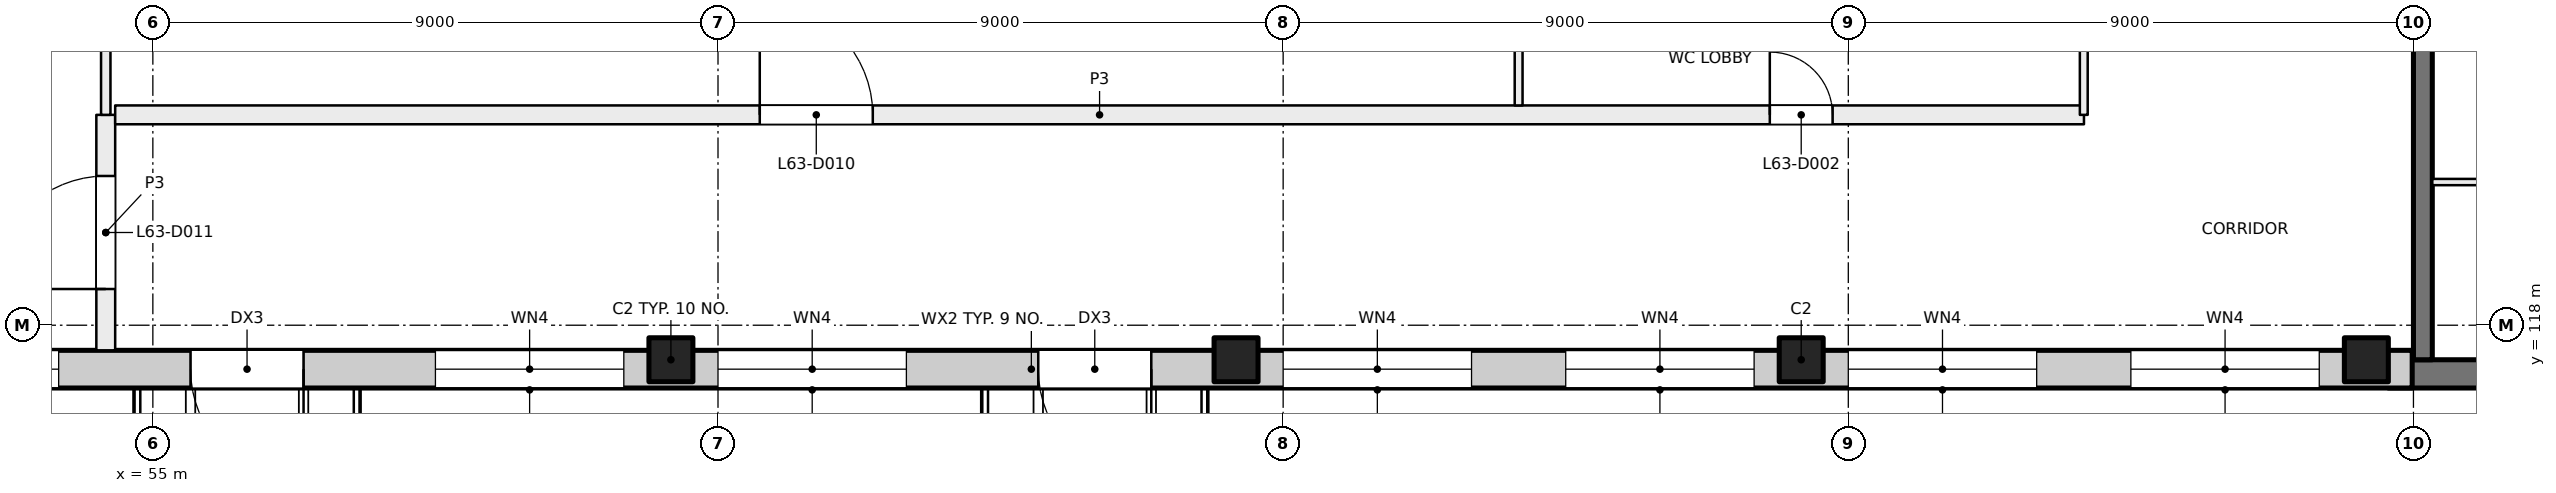
"""IFC4 building model, lengths in metres.
Left out: names, types, materials, properties, quantities, classifications, styles, units other than length and angle.
Written with IfcOpenShell. Run it as: python <this file> out.ifc"""

import sys

from ifc_helpers import new_model, si_unit, direction, frame, frame_2d, origin, origin_2d, place, context, subcontext, project, spatial, rectangle, extrude, element, fill, save


model = new_model("IFC4")
c1 = context("Model", 3, precision=1e-05, world=origin(), true_north=direction((0.0, 1.0)))
c2 = subcontext(c1, "Body", "Model", "MODEL_VIEW")
j1 = project(units=[si_unit("LENGTHUNIT", "METRE"), si_unit("PLANEANGLEUNIT", "RADIAN")], contexts=[c1])
p1 = place(None, origin())
s1 = spatial("IfcSite", under=j1, at=p1, CompositionType="ELEMENT")
p2 = place(p1, origin())
s2 = spatial("IfcBuilding", under=s1, at=p2, CompositionType="ELEMENT")
p3 = place(p2, frame((0.0, 0.0, 265.5)))
s3 = spatial("IfcBuildingStorey", under=s2, at=p3, CompositionType="ELEMENT", Elevation=265.5)
for number, where, z_axis, x_axis in (
    (1, (63.25, 117.45, 0.0), (0.0, 0.0, 1.0), (1.0, 0.0, 0.0)),
    (2, (72.25, 117.45, 0.0), (0.0, 0.0, 1.0), (1.0, 0.0, 0.0)),
    (3, (81.25, 117.45, 0.0), (0.0, 0.0, 1.0), (1.0, 0.0, 0.0)),
    (4, (90.25, 117.45, 0.0), (0.0, 0.0, 1.0), (1.0, 0.0, 0.0)),
):
    element("IfcColumn", number, at=place(p3, frame(where, z_axis=z_axis, x_axis=x_axis)), inside=s3, PredefinedType="COLUMN", context=c2, shape_type="SweptSolid", body=[
        extrude(rectangle(XDim=0.7, YDim=0.7, at=origin_2d()), origin(), (0.0, 0.0, 1.0), 4.0),
    ])
p4 = place(p3, frame((99.6, 117.225, 0.0), z_axis=(0.0, 0.0, 1.0), x_axis=(-1.0, 0.0, 0.0)))
e5 = element("IfcWall", 5, at=p4, inside=s3, PredefinedType="SHEAR", context=c2, shape_type="SweptSolid", body=[
    extrude(rectangle(XDim=9.0, YDim=0.45, at=frame_2d((4.5, 0.0))), origin(), (0.0, 0.0, 1.0), 4.0),
])
p5 = place(p3, frame((91.15, 126.2, 0.0), z_axis=(0.0, 0.0, 1.0), x_axis=(0.0, -1.0, 0.0)))
e6 = element("IfcWall", 6, at=p5, inside=s3, PredefinedType="SHEAR", context=c2, shape_type="SweptSolid", body=[
    extrude(rectangle(XDim=8.75, YDim=0.3, at=frame_2d((4.375, 0.0))), origin(), (0.0, 0.0, 1.0), 4.0),
])
p6 = place(p3, frame((90.98, 117.3, 0.0), z_axis=(0.0, 0.0, 1.0), x_axis=(-1.0, 0.0, 0.0)))
e7 = element("IfcWall", 7, at=p6, inside=s3, PredefinedType="SOLIDWALL", context=c2, shape_type="SweptSolid", body=[
    extrude(rectangle(XDim=43.98, YDim=0.6, at=frame_2d((21.99, 0.0))), origin(), (0.0, 0.0, 1.0), 3.625),
])
p7 = place(p6, frame((1.48, 0.0, 0.9)))
e8 = element("IfcOpeningElement", 8, at=p7, cuts=e7, PredefinedType="OPENING", context=c2, shape_type="SweptSolid", body=[
    extrude(rectangle(XDim=3.0, YDim=2.4, at=frame_2d((1.5, 1.2))), frame((0.0, 0.31, 0.0), z_axis=(0.0, -1.0, 0.0), x_axis=(1.0, 0.0, 0.0)), (0.0, 0.0, 1.0), 0.62),
])
p8 = place(p6, frame((5.98, 0.0, 0.9)))
e9 = element("IfcOpeningElement", 9, at=p8, cuts=e7, PredefinedType="OPENING", context=c2, shape_type="SweptSolid", body=[
    extrude(rectangle(XDim=3.0, YDim=2.4, at=frame_2d((1.5, 1.2))), frame((0.0, 0.31, 0.0), z_axis=(0.0, -1.0, 0.0), x_axis=(1.0, 0.0, 0.0)), (0.0, 0.0, 1.0), 0.62),
])
p9 = place(p6, frame((10.48, 0.0, 0.9)))
e10 = element("IfcOpeningElement", 10, at=p9, cuts=e7, PredefinedType="OPENING", context=c2, shape_type="SweptSolid", body=[
    extrude(rectangle(XDim=3.0, YDim=2.4, at=frame_2d((1.5, 1.2))), frame((0.0, 0.31, 0.0), z_axis=(0.0, -1.0, 0.0), x_axis=(1.0, 0.0, 0.0)), (0.0, 0.0, 1.0), 0.62),
])
p10 = place(p6, frame((14.98, 0.0, 0.9)))
e11 = element("IfcOpeningElement", 11, at=p10, cuts=e7, PredefinedType="OPENING", context=c2, shape_type="SweptSolid", body=[
    extrude(rectangle(XDim=3.0, YDim=2.4, at=frame_2d((1.5, 1.2))), frame((0.0, 0.31, 0.0), z_axis=(0.0, -1.0, 0.0), x_axis=(1.0, 0.0, 0.0)), (0.0, 0.0, 1.0), 0.62),
])
p11 = place(p6, frame((20.08, 0.0, 0.0)))
e12 = element("IfcOpeningElement", 12, at=p11, cuts=e7, PredefinedType="OPENING", context=c2, shape_type="SweptSolid", body=[
    extrude(rectangle(XDim=1.8, YDim=2.4, at=frame_2d((0.9, 1.2))), frame((0.0, 0.31, 0.0), z_axis=(0.0, -1.0, 0.0), x_axis=(1.0, 0.0, 0.0)), (0.0, 0.0, 1.0), 0.62),
])
p12 = place(p6, frame((23.98, 0.0, 0.9)))
e13 = element("IfcOpeningElement", 13, at=p12, cuts=e7, PredefinedType="OPENING", context=c2, shape_type="SweptSolid", body=[
    extrude(rectangle(XDim=3.0, YDim=2.4, at=frame_2d((1.5, 1.2))), frame((0.0, 0.31, 0.0), z_axis=(0.0, -1.0, 0.0), x_axis=(1.0, 0.0, 0.0)), (0.0, 0.0, 1.0), 0.62),
])
p13 = place(p6, frame((28.48, 0.0, 0.9)))
e14 = element("IfcOpeningElement", 14, at=p13, cuts=e7, PredefinedType="OPENING", context=c2, shape_type="SweptSolid", body=[
    extrude(rectangle(XDim=3.0, YDim=2.4, at=frame_2d((1.5, 1.2))), frame((0.0, 0.31, 0.0), z_axis=(0.0, -1.0, 0.0), x_axis=(1.0, 0.0, 0.0)), (0.0, 0.0, 1.0), 0.62),
])
p14 = place(p6, frame((33.58, 0.0, 0.0)))
e15 = element("IfcOpeningElement", 15, at=p14, cuts=e7, PredefinedType="OPENING", context=c2, shape_type="SweptSolid", body=[
    extrude(rectangle(XDim=1.8, YDim=2.4, at=frame_2d((0.9, 1.2))), frame((0.0, 0.31, 0.0), z_axis=(0.0, -1.0, 0.0), x_axis=(1.0, 0.0, 0.0)), (0.0, 0.0, 1.0), 0.62),
])
p15 = place(p6, frame((37.48, 0.0, 0.9)))
e16 = element("IfcOpeningElement", 16, at=p15, cuts=e7, PredefinedType="OPENING", context=c2, shape_type="SweptSolid", body=[
    extrude(rectangle(XDim=3.0, YDim=2.4, at=frame_2d((1.5, 1.2))), frame((0.0, 0.31, 0.0), z_axis=(0.0, -1.0, 0.0), x_axis=(1.0, 0.0, 0.0)), (0.0, 0.0, 1.0), 0.62),
])
p16 = place(p3, frame((93.4, 120.28, 0.0), z_axis=(0.0, 0.0, 1.0), x_axis=(-1.0, 0.0, 0.0)))
e17 = element("IfcWall", 17, at=p16, inside=s3, PredefinedType="PARTITIONING", context=c2, shape_type="SweptSolid", body=[
    extrude(rectangle(XDim=2.1, YDim=0.1, at=frame_2d((1.05, 0.0))), origin(), (0.0, 0.0, 1.0), 3.625),
])
p17 = place(p3, frame((54.25, 117.6, 0.0), z_axis=(0.0, 0.0, 1.0), x_axis=(0.0, 1.0, 0.0)))
e18 = element("IfcWall", 18, at=p17, inside=s3, PredefinedType="PARTITIONING", context=c2, shape_type="SweptSolid", body=[
    extrude(rectangle(XDim=3.75, YDim=0.3, at=frame_2d((1.875, 0.0))), origin(), (0.0, 0.0, 1.0), 3.625),
])
p18 = place(p17, frame((0.977, 0.0, 0.0)))
e19 = element("IfcOpeningElement", 19, at=p18, cuts=e18, PredefinedType="OPENING", context=c2, shape_type="SweptSolid", body=[
    extrude(rectangle(XDim=1.8, YDim=2.1, at=frame_2d((0.9, 1.05))), frame((0.0, 0.16, 0.0), z_axis=(0.0, -1.0, 0.0), x_axis=(1.0, 0.0, 0.0)), (0.0, 0.0, 1.0), 0.32),
])
p19 = place(p3, frame((54.25, 121.35, 0.0), z_axis=(0.0, 0.0, 1.0), x_axis=(0.0, 1.0, 0.0)))
e20 = element("IfcWall", 20, at=p19, inside=s3, PredefinedType="PARTITIONING", context=c2, shape_type="SweptSolid", body=[
    extrude(rectangle(XDim=17.05, YDim=0.15, at=frame_2d((8.525, 0.0))), origin(), (0.0, 0.0, 1.0), 3.625),
])
p20 = place(p3, frame((54.4, 121.35, 0.0), z_axis=(0.0, 0.0, 1.0), x_axis=(1.0, 0.0, 0.0)))
e21 = element("IfcWall", 21, at=p20, inside=s3, PredefinedType="PARTITIONING", context=c2, shape_type="SweptSolid", body=[
    extrude(rectangle(XDim=31.353, YDim=0.3, at=frame_2d((15.677, 0.0))), origin(), (0.0, 0.0, 1.0), 3.625),
])
p21 = place(p20, frame((26.35, 0.0, 0.0)))
e22 = element("IfcOpeningElement", 22, at=p21, cuts=e21, PredefinedType="OPENING", context=c2, shape_type="SweptSolid", body=[
    extrude(rectangle(XDim=1.0, YDim=2.1, at=frame_2d((0.5, 1.05))), frame((0.0, 0.16, 0.0), z_axis=(0.0, -1.0, 0.0), x_axis=(1.0, 0.0, 0.0)), (0.0, 0.0, 1.0), 0.32),
])
p22 = place(p20, frame((10.265, 0.0, 0.0)))
e23 = element("IfcOpeningElement", 23, at=p22, cuts=e21, PredefinedType="OPENING", context=c2, shape_type="SweptSolid", body=[
    extrude(rectangle(XDim=1.8, YDim=2.1, at=frame_2d((0.9, 1.05))), frame((0.0, 0.16, 0.0), z_axis=(0.0, -1.0, 0.0), x_axis=(1.0, 0.0, 0.0)), (0.0, 0.0, 1.0), 0.32),
])
p23 = place(p3, frame((76.75, 121.5, 0.0), z_axis=(0.0, 0.0, 1.0), x_axis=(0.0, 1.0, 0.0)))
e24 = element("IfcWall", 24, at=p23, inside=s3, PredefinedType="PARTITIONING", context=c2, shape_type="SweptSolid", body=[
    extrude(rectangle(XDim=4.438, YDim=0.125, at=frame_2d((2.219, 0.0))), origin(), (0.0, 0.0, 1.0), 3.625),
])
p24 = place(p3, frame((85.75, 121.35, 0.0), z_axis=(0.0, 0.0, 1.0), x_axis=(0.0, 1.0, 0.0)))
e25 = element("IfcWall", 25, at=p24, inside=s3, PredefinedType="PARTITIONING", context=c2, shape_type="SweptSolid", body=[
    extrude(rectangle(XDim=4.578, YDim=0.125, at=frame_2d((2.289, 0.0))), origin(), (0.0, 0.0, 1.0), 3.625),
])
p25 = place(p7, origin())
e26 = element("IfcWindow", 26, at=p25, inside=s3, PartitioningType="SINGLE_PANEL", PredefinedType="WINDOW", context=c2, shape_type="SweptSolid", body=[
    extrude(rectangle(XDim=3.0, YDim=2.4, at=frame_2d((1.5, 1.2))), frame((0.0, 0.03, 0.0), z_axis=(0.0, -1.0, 0.0), x_axis=(1.0, 0.0, 0.0)), (0.0, 0.0, 1.0), 0.06),
])
fill(e8, e26)
p26 = place(p8, origin())
e27 = element("IfcWindow", 27, at=p26, inside=s3, PartitioningType="SINGLE_PANEL", PredefinedType="WINDOW", context=c2, shape_type="SweptSolid", body=[
    extrude(rectangle(XDim=3.0, YDim=2.4, at=frame_2d((1.5, 1.2))), frame((0.0, 0.03, 0.0), z_axis=(0.0, -1.0, 0.0), x_axis=(1.0, 0.0, 0.0)), (0.0, 0.0, 1.0), 0.06),
])
fill(e9, e27)
p27 = place(p9, origin())
e28 = element("IfcWindow", 28, at=p27, inside=s3, PartitioningType="SINGLE_PANEL", PredefinedType="WINDOW", context=c2, shape_type="SweptSolid", body=[
    extrude(rectangle(XDim=3.0, YDim=2.4, at=frame_2d((1.5, 1.2))), frame((0.0, 0.03, 0.0), z_axis=(0.0, -1.0, 0.0), x_axis=(1.0, 0.0, 0.0)), (0.0, 0.0, 1.0), 0.06),
])
fill(e10, e28)
p28 = place(p10, origin())
e29 = element("IfcWindow", 29, at=p28, inside=s3, PartitioningType="SINGLE_PANEL", PredefinedType="WINDOW", context=c2, shape_type="SweptSolid", body=[
    extrude(rectangle(XDim=3.0, YDim=2.4, at=frame_2d((1.5, 1.2))), frame((0.0, 0.03, 0.0), z_axis=(0.0, -1.0, 0.0), x_axis=(1.0, 0.0, 0.0)), (0.0, 0.0, 1.0), 0.06),
])
fill(e11, e29)
p29 = place(p11, origin())
e30 = element("IfcDoor", 30, at=p29, inside=s3, OperationType="DOUBLE_DOOR_SINGLE_SWING", PredefinedType="DOOR", context=c2, shape_type="SweptSolid", body=[
    extrude(rectangle(XDim=1.8, YDim=2.4, at=frame_2d((0.9, 1.2))), frame((0.0, 0.025, 0.0), z_axis=(0.0, -1.0, 0.0), x_axis=(1.0, 0.0, 0.0)), (0.0, 0.0, 1.0), 0.05),
])
fill(e12, e30)
p30 = place(p12, origin())
e31 = element("IfcWindow", 31, at=p30, inside=s3, PartitioningType="SINGLE_PANEL", PredefinedType="WINDOW", context=c2, shape_type="SweptSolid", body=[
    extrude(rectangle(XDim=3.0, YDim=2.4, at=frame_2d((1.5, 1.2))), frame((0.0, 0.03, 0.0), z_axis=(0.0, -1.0, 0.0), x_axis=(1.0, 0.0, 0.0)), (0.0, 0.0, 1.0), 0.06),
])
fill(e13, e31)
p31 = place(p13, origin())
e32 = element("IfcWindow", 32, at=p31, inside=s3, PartitioningType="SINGLE_PANEL", PredefinedType="WINDOW", context=c2, shape_type="SweptSolid", body=[
    extrude(rectangle(XDim=3.0, YDim=2.4, at=frame_2d((1.5, 1.2))), frame((0.0, 0.03, 0.0), z_axis=(0.0, -1.0, 0.0), x_axis=(1.0, 0.0, 0.0)), (0.0, 0.0, 1.0), 0.06),
])
fill(e14, e32)
p32 = place(p14, origin())
e33 = element("IfcDoor", 33, at=p32, inside=s3, OperationType="DOUBLE_DOOR_SINGLE_SWING", PredefinedType="DOOR", context=c2, shape_type="SweptSolid", body=[
    extrude(rectangle(XDim=1.8, YDim=2.4, at=frame_2d((0.9, 1.2))), frame((0.0, 0.025, 0.0), z_axis=(0.0, -1.0, 0.0), x_axis=(1.0, 0.0, 0.0)), (0.0, 0.0, 1.0), 0.05),
])
fill(e15, e33)
p33 = place(p15, origin())
e34 = element("IfcWindow", 34, at=p33, inside=s3, PartitioningType="SINGLE_PANEL", PredefinedType="WINDOW", context=c2, shape_type="SweptSolid", body=[
    extrude(rectangle(XDim=3.0, YDim=2.4, at=frame_2d((1.5, 1.2))), frame((0.0, 0.03, 0.0), z_axis=(0.0, -1.0, 0.0), x_axis=(1.0, 0.0, 0.0)), (0.0, 0.0, 1.0), 0.06),
])
fill(e16, e34)
p34 = place(p21, origin())
e35 = element("IfcDoor", 35, at=p34, inside=s3, OperationType="SINGLE_SWING_LEFT", PredefinedType="DOOR", context=c2, shape_type="SweptSolid", body=[
    extrude(rectangle(XDim=1.0, YDim=2.1, at=frame_2d((0.5, 1.05))), frame((0.0, 0.025, 0.0), z_axis=(0.0, -1.0, 0.0), x_axis=(1.0, 0.0, 0.0)), (0.0, 0.0, 1.0), 0.05),
])
fill(e22, e35)
p35 = place(p22, origin())
e36 = element("IfcDoor", 36, at=p35, inside=s3, OperationType="DOUBLE_DOOR_SINGLE_SWING", PredefinedType="DOOR", context=c2, shape_type="SweptSolid", body=[
    extrude(rectangle(XDim=1.8, YDim=2.1, at=frame_2d((0.9, 1.05))), frame((0.0, 0.025, 0.0), z_axis=(0.0, -1.0, 0.0), x_axis=(1.0, 0.0, 0.0)), (0.0, 0.0, 1.0), 0.05),
])
fill(e23, e36)
p36 = place(p18, origin())
e37 = element("IfcDoor", 37, at=p36, inside=s3, OperationType="DOUBLE_DOOR_SINGLE_SWING", PredefinedType="DOOR", context=c2, shape_type="SweptSolid", body=[
    extrude(rectangle(XDim=1.8, YDim=2.1, at=frame_2d((0.9, 1.05))), frame((0.0, 0.025, 0.0), z_axis=(0.0, -1.0, 0.0), x_axis=(1.0, 0.0, 0.0)), (0.0, 0.0, 1.0), 0.05),
])
fill(e19, e37)
save(model, sys.argv[1])
